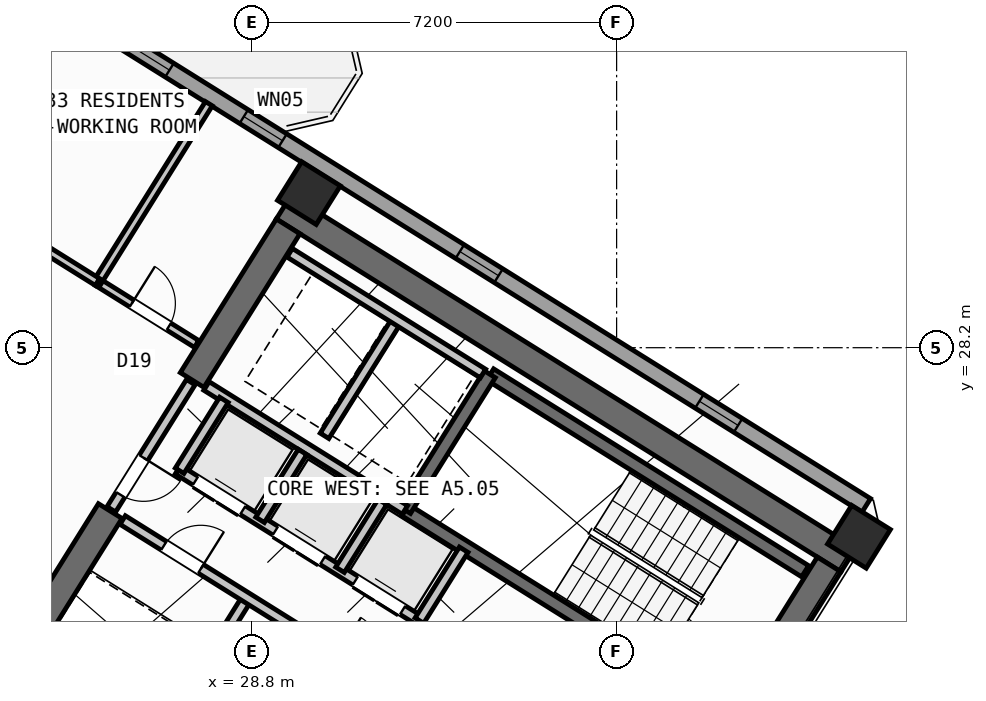
"""IFC4 building model, lengths in metres.
Left out: names, types, materials, properties, quantities, classifications, styles, units other than length and angle.
Written with IfcOpenShell. Run it as: python <this file> out.ifc"""

import sys

from ifc_helpers import new_model, si_unit, direction, frame, frame_2d, origin, origin_2d, place, context, subcontext, project, spatial, rectangle, hollow_rectangle, extrude, source, transform, mapped, element, fill, save


model = new_model("IFC4")
c1 = context("Model", 3, precision=1e-05, world=origin(), true_north=direction((0.0, 1.0)))
c2 = subcontext(c1, "Body", "Model", "MODEL_VIEW")
j1 = project(units=[si_unit("LENGTHUNIT", "METRE"), si_unit("PLANEANGLEUNIT", "RADIAN")], contexts=[c1])
p1 = place(None, origin())
s1 = spatial("IfcSite", under=j1, at=p1, CompositionType="ELEMENT")
p2 = place(p1, origin())
s2 = spatial("IfcBuilding", under=s1, at=p2, CompositionType="ELEMENT")
p3 = place(p2, frame((0.0, 0.0, 132.6)))
s3 = spatial("IfcBuildingStorey", under=s2, at=p3, CompositionType="ELEMENT", Elevation=132.6)
p4 = place(p3, frame((40.573, 24.01, 0.0), z_axis=(0.0, 0.0, 1.0), x_axis=(-0.848047359947, 0.529920442413, 0.0)))
e1 = element("IfcWall", 1, at=p4, inside=s3, PredefinedType="SHEAR", context=c2, shape_type="SweptSolid", body=[
    extrude(rectangle(XDim=13.14, YDim=0.55, at=frame_2d((6.57, 0.0))), origin(), (0.0, 0.0, 1.0), 3.32),
])
p5 = place(p3, frame((40.194, 23.922, 0.0), z_axis=(0.0, 0.0, 1.0), x_axis=(-0.529888438328, -0.848067357541, 0.0)))
e2 = element("IfcWall", 2, at=p5, inside=s3, PredefinedType="SHEAR", context=c2, shape_type="SweptSolid", body=[
    extrude(rectangle(XDim=3.575, YDim=0.55, at=frame_2d((1.788, 0.0))), origin(), (0.0, 0.0, 1.0), 3.32),
])
p6 = place(p3, frame((29.517, 30.594, 0.0), z_axis=(0.0, 0.0, 1.0), x_axis=(-0.529906864564, -0.848055844204, 0.0)))
e3 = element("IfcWall", 3, at=p6, inside=s3, PredefinedType="SHEAR", context=c2, shape_type="SweptSolid", body=[
    extrude(rectangle(XDim=3.575, YDim=0.55, at=frame_2d((1.788, 0.0))), origin(), (0.0, 0.0, 1.0), 3.32),
])
p7 = place(p3, frame((26.007, 24.976, 0.0), z_axis=(0.0, 0.0, 1.0), x_axis=(-0.529923795287, -0.848045264823, 0.0)))
e4 = element("IfcWall", 4, at=p7, inside=s3, PredefinedType="SHEAR", context=c2, shape_type="SweptSolid", body=[
    extrude(rectangle(XDim=6.425, YDim=0.55, at=frame_2d((3.212, 0.0))), origin(), (0.0, 0.0, 1.0), 3.32),
])
m1 = source(origin(), c2, "Body", "SweptSolid", [
    extrude(hollow_rectangle(XDim=0.9, YDim=0.9, WallThickness=0.036, at=origin_2d()), origin(), (0.0, 0.0, 1.0), 3.6),
])
for number, where, z_axis, x_axis in (
    (5, (40.783, 24.469, 0.0), (0.0, 0.0, 1.0), (-0.848, 0.53, 0.0)),
    (6, (29.928, 31.251, 0.0), (0.0, 0.0, 1.0), (-0.848, 0.53, 0.0)),
    (7, (24.5, 34.643, 0.0), (0.0, 0.0, 1.0), (-0.848, 0.53, 0.0)),
):
    element("IfcColumn", number, at=place(p3, frame(where, z_axis=z_axis, x_axis=x_axis)), inside=s3, PredefinedType="COLUMN", context=c2, shape_type="MappedRepresentation", body=[
        mapped(m1, transform((0.0, 0.0, 0.0), scale=1.0)),
    ])
p8 = place(p3, frame((29.268, 6.429, 0.0), z_axis=(0.0, 0.0, 1.0), x_axis=(-0.848049971435, 0.529916263149, 0.0)))
e8 = element("IfcWall", 8, at=p8, inside=s3, PredefinedType="STANDARD", context=c2, shape_type="SweptSolid", body=[
    extrude(rectangle(XDim=31.588, YDim=0.32, at=frame_2d((15.794, 0.0))), origin(), (0.0, 0.0, 1.0), 3.32),
])
p9 = place(p8, frame((16.362, 0.0, 0.0)))
e9 = element("IfcOpeningElement", 9, at=p9, cuts=e8, PredefinedType="OPENING", context=c2, shape_type="SweptSolid", body=[
    extrude(rectangle(XDim=1.2, YDim=2.15, at=frame_2d((0.6, 1.075))), frame((0.0, 0.17, 0.0), z_axis=(0.0, -1.0, 0.0), x_axis=(1.0, 0.0, 0.0)), (0.0, 0.0, 1.0), 0.34),
])
p10 = place(p8, frame((2.989, 0.0, 0.8)))
e10 = element("IfcOpeningElement", 10, at=p10, cuts=e8, PredefinedType="OPENING", context=c2, shape_type="SweptSolid", body=[
    extrude(rectangle(XDim=2.1, YDim=1.55, at=frame_2d((1.05, 0.775))), frame((0.0, 0.17, 0.0), z_axis=(0.0, -1.0, 0.0), x_axis=(1.0, 0.0, 0.0)), (0.0, 0.0, 1.0), 0.34),
])
p11 = place(p8, frame((8.359, 0.0, 0.8)))
e11 = element("IfcOpeningElement", 11, at=p11, cuts=e8, PredefinedType="OPENING", context=c2, shape_type="SweptSolid", body=[
    extrude(rectangle(XDim=2.1, YDim=1.55, at=frame_2d((1.05, 0.775))), frame((0.0, 0.17, 0.0), z_axis=(0.0, -1.0, 0.0), x_axis=(1.0, 0.0, 0.0)), (0.0, 0.0, 1.0), 0.34),
])
p12 = place(p8, frame((13.284, 0.0, 0.95)))
e12 = element("IfcOpeningElement", 12, at=p12, cuts=e8, PredefinedType="OPENING", context=c2, shape_type="SweptSolid", body=[
    extrude(rectangle(XDim=1.2, YDim=1.4, at=frame_2d((0.6, 0.7))), frame((0.0, 0.17, 0.0), z_axis=(0.0, -1.0, 0.0), x_axis=(1.0, 0.0, 0.0)), (0.0, 0.0, 1.0), 0.34),
])
p13 = place(p8, frame((20.39, 0.0, 0.95)))
e13 = element("IfcOpeningElement", 13, at=p13, cuts=e8, PredefinedType="OPENING", context=c2, shape_type="SweptSolid", body=[
    extrude(rectangle(XDim=1.2, YDim=1.4, at=frame_2d((0.6, 0.7))), frame((0.0, 0.17, 0.0), z_axis=(0.0, -1.0, 0.0), x_axis=(1.0, 0.0, 0.0)), (0.0, 0.0, 1.0), 0.34),
])
p14 = place(p8, frame((23.715, 0.0, 1.0)))
e14 = element("IfcOpeningElement", 14, at=p14, cuts=e8, PredefinedType="OPENING", context=c2, shape_type="SweptSolid", body=[
    extrude(rectangle(XDim=0.9, YDim=1.25, at=frame_2d((0.45, 0.625))), frame((0.0, 0.17, 0.0), z_axis=(0.0, -1.0, 0.0), x_axis=(1.0, 0.0, 0.0)), (0.0, 0.0, 1.0), 0.34),
])
p15 = place(p8, frame((27.481, 0.0, 0.8)))
e15 = element("IfcOpeningElement", 15, at=p15, cuts=e8, PredefinedType="OPENING", context=c2, shape_type="SweptSolid", body=[
    extrude(rectangle(XDim=2.1, YDim=1.55, at=frame_2d((1.05, 0.775))), frame((0.0, 0.17, 0.0), z_axis=(0.0, -1.0, 0.0), x_axis=(1.0, 0.0, 0.0)), (0.0, 0.0, 1.0), 0.34),
])
p16 = place(p3, frame((14.138, 41.825, 0.0), z_axis=(0.0, 0.0, 1.0), x_axis=(0.848046498049, -0.529921821731, 0.0)))
e16 = element("IfcWall", 16, at=p16, inside=s3, PredefinedType="STANDARD", context=c2, shape_type="SweptSolid", body=[
    extrude(rectangle(XDim=31.588, YDim=0.32, at=frame_2d((15.794, 0.0))), origin(), (0.0, 0.0, 1.0), 3.32),
])
p17 = place(p16, frame((3.253, 0.0, 0.0)))
e17 = element("IfcOpeningElement", 17, at=p17, cuts=e16, PredefinedType="OPENING", context=c2, shape_type="SweptSolid", body=[
    extrude(rectangle(XDim=1.05, YDim=2.15, at=frame_2d((0.525, 1.075))), frame((0.0, 0.17, 0.0), z_axis=(0.0, -1.0, 0.0), x_axis=(1.0, 0.0, 0.0)), (0.0, 0.0, 1.0), 0.34),
])
p18 = place(p16, frame((0.863, 0.0, 0.85)))
e18 = element("IfcOpeningElement", 18, at=p18, cuts=e16, PredefinedType="OPENING", context=c2, shape_type="SweptSolid", body=[
    extrude(rectangle(XDim=1.8, YDim=1.5, at=frame_2d((0.9, 0.75))), frame((0.0, 0.17, 0.0), z_axis=(0.0, -1.0, 0.0), x_axis=(1.0, 0.0, 0.0)), (0.0, 0.0, 1.0), 0.34),
])
p19 = place(p16, frame((8.435, 0.0, 0.85)))
e19 = element("IfcOpeningElement", 19, at=p19, cuts=e16, PredefinedType="OPENING", context=c2, shape_type="SweptSolid", body=[
    extrude(rectangle(XDim=1.8, YDim=1.5, at=frame_2d((0.9, 0.75))), frame((0.0, 0.17, 0.0), z_axis=(0.0, -1.0, 0.0), x_axis=(1.0, 0.0, 0.0)), (0.0, 0.0, 1.0), 0.34),
])
p20 = place(p16, frame((13.874, 0.0, 0.85)))
e20 = element("IfcOpeningElement", 20, at=p20, cuts=e16, PredefinedType="OPENING", context=c2, shape_type="SweptSolid", body=[
    extrude(rectangle(XDim=1.5, YDim=1.5, at=frame_2d((0.75, 0.75))), frame((0.0, 0.17, 0.0), z_axis=(0.0, -1.0, 0.0), x_axis=(1.0, 0.0, 0.0)), (0.0, 0.0, 1.0), 0.34),
])
p21 = place(p16, frame((17.104, 0.0, 1.0)))
e21 = element("IfcOpeningElement", 21, at=p21, cuts=e16, PredefinedType="OPENING", context=c2, shape_type="SweptSolid", body=[
    extrude(rectangle(XDim=0.9, YDim=1.25, at=frame_2d((0.45, 0.625))), frame((0.0, 0.17, 0.0), z_axis=(0.0, -1.0, 0.0), x_axis=(1.0, 0.0, 0.0)), (0.0, 0.0, 1.0), 0.34),
])
p22 = place(p16, frame((22.131, 0.0, 1.0)))
e22 = element("IfcOpeningElement", 22, at=p22, cuts=e16, PredefinedType="OPENING", context=c2, shape_type="SweptSolid", body=[
    extrude(rectangle(XDim=0.9, YDim=1.25, at=frame_2d((0.45, 0.625))), frame((0.0, 0.17, 0.0), z_axis=(0.0, -1.0, 0.0), x_axis=(1.0, 0.0, 0.0)), (0.0, 0.0, 1.0), 0.34),
])
p23 = place(p16, frame((27.706, 0.0, 1.0)))
e23 = element("IfcOpeningElement", 23, at=p23, cuts=e16, PredefinedType="OPENING", context=c2, shape_type="SweptSolid", body=[
    extrude(rectangle(XDim=0.9, YDim=1.25, at=frame_2d((0.45, 0.625))), frame((0.0, 0.17, 0.0), z_axis=(0.0, -1.0, 0.0), x_axis=(1.0, 0.0, 0.0)), (0.0, 0.0, 1.0), 0.34),
])
p24 = place(p3, frame((39.721, 23.788, 0.0), z_axis=(0.0, 0.0, 1.0), x_axis=(-0.848054434086, 0.529909121291, 0.0)))
e24 = element("IfcWall", 24, at=p24, inside=s3, PredefinedType="SHEAR", context=c2, shape_type="SweptSolid", body=[
    extrude(rectangle(XDim=7.33, YDim=0.26, at=frame_2d((3.665, 0.0))), origin(), (0.0, 0.0, 1.0), 3.32),
])
p25 = place(p3, frame((38.046, 21.108, 0.0), z_axis=(0.0, 0.0, 1.0), x_axis=(-0.848054434086, 0.529909121291, 0.0)))
e25 = element("IfcWall", 25, at=p25, inside=s3, PredefinedType="SHEAR", context=c2, shape_type="SweptSolid", body=[
    extrude(rectangle(XDim=7.33, YDim=0.26, at=frame_2d((3.665, 0.0))), origin(), (0.0, 0.0, 1.0), 3.32),
])
p26 = place(p25, frame((0.22, 0.0, 0.0)))
e26 = element("IfcOpeningElement", 26, at=p26, cuts=e25, PredefinedType="OPENING", context=c2, shape_type="SweptSolid", body=[
    extrude(rectangle(XDim=1.1, YDim=2.1, at=frame_2d((0.55, 1.05))), frame((0.0, 0.14, 0.0), z_axis=(0.0, -1.0, 0.0), x_axis=(1.0, 0.0, 0.0)), (0.0, 0.0, 1.0), 0.28),
])
p27 = place(p3, frame((33.496, 27.677, 0.0), z_axis=(0.0, 0.0, 1.0), x_axis=(-0.529908658664, -0.84805472316, 0.0)))
e27 = element("IfcWall", 27, at=p27, inside=s3, PredefinedType="SHEAR", context=c2, shape_type="SweptSolid", body=[
    extrude(rectangle(XDim=3.16, YDim=0.26, at=frame_2d((1.58, 0.0))), origin(), (0.0, 0.0, 1.0), 3.32),
])
p28 = place(p3, frame((31.822, 24.998, 0.0), z_axis=(0.0, 0.0, 1.0), x_axis=(-0.848036912365, 0.52993716162, 0.0)))
e28 = element("IfcWall", 28, at=p28, inside=s3, PredefinedType="STANDARD", context=c2, shape_type="SweptSolid", body=[
    extrude(rectangle(XDim=4.618, YDim=0.2, at=frame_2d((2.309, 0.0))), origin(), (0.0, 0.0, 1.0), 3.31),
])
p29 = place(p3, frame((32.108, 22.814, 0.0), z_axis=(0.0, 0.0, 1.0), x_axis=(-0.848042229521, 0.529928652696, 0.0)))
e29 = element("IfcWall", 29, at=p29, inside=s3, PredefinedType="STANDARD", context=c2, shape_type="SweptSolid", body=[
    extrude(rectangle(XDim=5.62, YDim=0.2, at=frame_2d((2.81, 0.0))), origin(), (0.0, 0.0, 1.0), 3.31),
])
p30 = place(p29, frame((0.39, 0.0, 0.0)))
e30 = element("IfcOpeningElement", 30, at=p30, cuts=e29, PredefinedType="OPENING", context=c2, shape_type="SweptSolid", body=[
    extrude(rectangle(XDim=1.1, YDim=2.15, at=frame_2d((0.55, 1.075))), frame((0.0, 0.11, 0.0), z_axis=(0.0, -1.0, 0.0), x_axis=(1.0, 0.0, 0.0)), (0.0, 0.0, 1.0), 0.22),
])
p31 = place(p29, frame((2.25, 0.0, 0.0)))
e31 = element("IfcOpeningElement", 31, at=p31, cuts=e29, PredefinedType="OPENING", context=c2, shape_type="SweptSolid", body=[
    extrude(rectangle(XDim=1.1, YDim=2.15, at=frame_2d((0.55, 1.075))), frame((0.0, 0.11, 0.0), z_axis=(0.0, -1.0, 0.0), x_axis=(1.0, 0.0, 0.0)), (0.0, 0.0, 1.0), 0.22),
])
p32 = place(p29, frame((4.11, 0.0, 0.0)))
e32 = element("IfcOpeningElement", 32, at=p32, cuts=e29, PredefinedType="OPENING", context=c2, shape_type="SweptSolid", body=[
    extrude(rectangle(XDim=1.1, YDim=2.15, at=frame_2d((0.55, 1.075))), frame((0.0, 0.11, 0.0), z_axis=(0.0, -1.0, 0.0), x_axis=(1.0, 0.0, 0.0)), (0.0, 0.0, 1.0), 0.22),
])
p33 = place(p3, frame((32.982, 24.213, 0.0), z_axis=(0.0, 0.0, 1.0), x_axis=(-0.529839334948, -0.84809803628, 0.0)))
e33 = element("IfcWall", 33, at=p33, inside=s3, PredefinedType="STANDARD", context=c2, shape_type="SweptSolid", body=[
    extrude(rectangle(XDim=1.65, YDim=0.2, at=frame_2d((0.825, 0.0))), origin(), (0.0, 0.0, 1.0), 3.31),
])
p34 = place(p3, frame((28.25, 27.17, 0.0), z_axis=(0.0, 0.0, 1.0), x_axis=(-0.529905827651, -0.848056492117, 0.0)))
e34 = element("IfcWall", 34, at=p34, inside=s3, PredefinedType="STANDARD", context=c2, shape_type="SweptSolid", body=[
    extrude(rectangle(XDim=1.65, YDim=0.2, at=frame_2d((0.825, 0.0))), origin(), (0.0, 0.0, 1.0), 3.31),
])
p35 = place(p3, frame((31.645, 28.716, 0.0), z_axis=(0.0, 0.0, 1.0), x_axis=(-0.52986693015, -0.848080795876, 0.0)))
e35 = element("IfcWall", 35, at=p35, inside=s3, PredefinedType="STANDARD", context=c2, shape_type="SweptSolid", body=[
    extrude(rectangle(XDim=2.66, YDim=0.2, at=frame_2d((1.33, 0.0))), origin(), (0.0, 0.0, 1.0), 3.31),
])
p36 = place(p3, frame((33.363, 27.69, 0.0), z_axis=(0.0, 0.0, 1.0), x_axis=(-0.848047090064, 0.529920874315, 0.0)))
e36 = element("IfcWall", 36, at=p36, inside=s3, PredefinedType="STANDARD", context=c2, shape_type="SweptSolid", body=[
    extrude(rectangle(XDim=4.498, YDim=0.2, at=frame_2d((2.249, 0.0))), origin(), (0.0, 0.0, 1.0), 3.31),
])
for number, where, z_axis, x_axis in (
    (37, (31.379, 25.156, 0.0), (0.0, 0.0, 1.0), (-0.53, -0.848, 0.0)),
    (38, (29.801, 26.142, 0.0), (0.0, 0.0, 1.0), (-0.53, -0.848, 0.0)),
):
    element("IfcWall", number, at=place(p3, frame(where, z_axis=z_axis, x_axis=x_axis)), inside=s3, PredefinedType="STANDARD", context=c2, shape_type="SweptSolid", body=[
        extrude(rectangle(XDim=1.58, YDim=0.2, at=frame_2d((0.79, 0.0))), origin(), (0.0, 0.0, 1.0), 3.31),
    ])
p37 = place(p3, frame((28.71, 23.263, 0.0), z_axis=(0.0, 0.0, 1.0), x_axis=(-0.529907497854, -0.848055448493, 0.0)))
e39 = element("IfcWall", 39, at=p37, inside=s3, PredefinedType="STANDARD", context=c2, shape_type="SweptSolid", body=[
    extrude(rectangle(XDim=2.88, YDim=0.2, at=frame_2d((1.44, 0.0))), origin(), (0.0, 0.0, 1.0), 3.31),
])
p38 = place(p3, frame((31.525, 21.504, 0.0), z_axis=(0.0, 0.0, 1.0), x_axis=(-0.848040211232, 0.529931882541, 0.0)))
e40 = element("IfcWall", 40, at=p38, inside=s3, PredefinedType="STANDARD", context=c2, shape_type="SweptSolid", body=[
    extrude(rectangle(XDim=6.218, YDim=0.2, at=frame_2d((3.109, 0.0))), origin(), (0.0, 0.0, 1.0), 3.31),
])
p39 = place(p38, frame((4.4, 0.0, 0.0)))
e41 = element("IfcOpeningElement", 41, at=p39, cuts=e40, PredefinedType="OPENING", context=c2, shape_type="SweptSolid", body=[
    extrude(rectangle(XDim=0.86, YDim=2.05, at=frame_2d((0.43, 1.025))), frame((0.0, 0.11, 0.0), z_axis=(0.0, -1.0, 0.0), x_axis=(1.0, 0.0, 0.0)), (0.0, 0.0, 1.0), 0.22),
])
p40 = place(p38, frame((0.35, 0.0, 0.0)))
e42 = element("IfcOpeningElement", 42, at=p40, cuts=e40, PredefinedType="OPENING", context=c2, shape_type="SweptSolid", body=[
    extrude(rectangle(XDim=0.86, YDim=2.05, at=frame_2d((0.43, 1.025))), frame((0.0, 0.11, 0.0), z_axis=(0.0, -1.0, 0.0), x_axis=(1.0, 0.0, 0.0)), (0.0, 0.0, 1.0), 0.22),
])
p41 = place(p3, frame((27.596, 27.52, 0.0), z_axis=(0.0, 0.0, 1.0), x_axis=(-0.529865479138, -0.848081702443, 0.0)))
e43 = element("IfcWall", 43, at=p41, inside=s3, PredefinedType="STANDARD", context=c2, shape_type="SweptSolid", body=[
    extrude(rectangle(XDim=2.96, YDim=0.2, at=frame_2d((1.48, 0.0))), origin(), (0.0, 0.0, 1.0), 3.31),
])
p42 = place(p41, frame((1.76, 0.0, 0.0)))
e44 = element("IfcOpeningElement", 44, at=p42, cuts=e43, PredefinedType="OPENING", context=c2, shape_type="SweptSolid", body=[
    extrude(rectangle(XDim=0.86, YDim=2.05, at=frame_2d((0.43, 1.025))), frame((0.0, 0.11, 0.0), z_axis=(0.0, -1.0, 0.0), x_axis=(1.0, 0.0, 0.0)), (0.0, 0.0, 1.0), 0.22),
])
p43 = place(p3, frame((27.711, 28.274, 0.0), z_axis=(0.0, 0.0, 1.0), x_axis=(-0.848075553449, 0.529875320846, 0.0)))
e45 = element("IfcWall", 45, at=p43, inside=s3, PredefinedType="PARTITIONING", context=c2, shape_type="SweptSolid", body=[
    extrude(rectangle(XDim=2.308, YDim=0.16, at=frame_2d((1.154, 0.0))), origin(), (0.0, 0.0, 1.0), 3.31),
])
p44 = place(p43, frame((0.648, 0.0, 0.0)))
e46 = element("IfcOpeningElement", 46, at=p44, cuts=e45, PredefinedType="OPENING", context=c2, shape_type="SweptSolid", body=[
    extrude(rectangle(XDim=0.86, YDim=2.05, at=frame_2d((0.43, 1.025))), frame((0.0, 0.09, 0.0), z_axis=(0.0, -1.0, 0.0), x_axis=(1.0, 0.0, 0.0)), (0.0, 0.0, 1.0), 0.18),
])
p45 = place(p3, frame((27.953, 33.016, 0.0), z_axis=(0.0, 0.0, 1.0), x_axis=(-0.529872022255, -0.848077614391, 0.0)))
e47 = element("IfcWall", 47, at=p45, inside=s3, PredefinedType="PARTITIONING", context=c2, shape_type="SweptSolid", body=[
    extrude(rectangle(XDim=4.15, YDim=0.16, at=frame_2d((2.075, 0.0))), origin(), (0.0, 0.0, 1.0), 3.31),
])
p46 = place(p3, frame((25.754, 29.497, 0.0), z_axis=(0.0, 0.0, 1.0), x_axis=(-0.848045850158, 0.529922858565, 0.0)))
e48 = element("IfcWall", 48, at=p46, inside=s3, PredefinedType="PARTITIONING", context=c2, shape_type="SweptSolid", body=[
    extrude(rectangle(XDim=16.73, YDim=0.16, at=frame_2d((8.365, 0.0))), origin(), (0.0, 0.0, 1.0), 3.31),
])
p47 = place(p46, frame((1.588, 0.0, 0.0)))
e49 = element("IfcOpeningElement", 49, at=p47, cuts=e48, PredefinedType="OPENING", context=c2, shape_type="SweptSolid", body=[
    extrude(rectangle(XDim=1.0, YDim=2.1, at=frame_2d((0.5, 1.05))), frame((0.0, 0.09, 0.0), z_axis=(0.0, -1.0, 0.0), x_axis=(1.0, 0.0, 0.0)), (0.0, 0.0, 1.0), 0.18),
])
p48 = place(p46, frame((6.685, 0.0, 0.0)))
e50 = element("IfcOpeningElement", 50, at=p48, cuts=e48, PredefinedType="OPENING", context=c2, shape_type="SweptSolid", body=[
    extrude(rectangle(XDim=1.0, YDim=2.1, at=frame_2d((0.5, 1.05))), frame((0.0, 0.09, 0.0), z_axis=(0.0, -1.0, 0.0), x_axis=(1.0, 0.0, 0.0)), (0.0, 0.0, 1.0), 0.18),
])
p49 = place(p46, frame((12.951, 0.0, 0.0)))
e51 = element("IfcOpeningElement", 51, at=p49, cuts=e48, PredefinedType="OPENING", context=c2, shape_type="SweptSolid", body=[
    extrude(rectangle(XDim=1.0, YDim=2.1, at=frame_2d((0.5, 1.05))), frame((0.0, 0.09, 0.0), z_axis=(0.0, -1.0, 0.0), x_axis=(1.0, 0.0, 0.0)), (0.0, 0.0, 1.0), 0.18),
])
m2 = source(origin(), c2, "Body", "SweptSolid", [
    extrude(rectangle(XDim=1.5, YDim=1.5, at=frame_2d((0.75, 0.75))), frame((0.0, 0.03, 0.0), z_axis=(0.0, -1.0, 0.0), x_axis=(1.0, 0.0, 0.0)), (0.0, 0.0, 1.0), 0.06),
])
p50 = place(p20, origin())
e52 = element("IfcWindow", 52, at=p50, inside=s3, PartitioningType="SINGLE_PANEL", PredefinedType="WINDOW", context=c2, shape_type="MappedRepresentation", body=[
    mapped(m2, transform((0.0, 0.0, 0.0), scale=1.0)),
])
fill(e20, e52)
m3 = source(origin(), c2, "Body", "SweptSolid", [
    extrude(rectangle(XDim=0.9, YDim=1.25, at=frame_2d((0.45, 0.625))), frame((0.0, 0.03, 0.0), z_axis=(0.0, -1.0, 0.0), x_axis=(1.0, 0.0, 0.0)), (0.0, 0.0, 1.0), 0.06),
])
p51 = place(p21, origin())
e53 = element("IfcWindow", 53, at=p51, inside=s3, PartitioningType="SINGLE_PANEL", PredefinedType="WINDOW", context=c2, shape_type="MappedRepresentation", body=[
    mapped(m3, transform((0.0, 0.0, 0.0), scale=1.0)),
])
fill(e21, e53)
p52 = place(p22, origin())
e54 = element("IfcWindow", 54, at=p52, inside=s3, PartitioningType="SINGLE_PANEL", PredefinedType="WINDOW", context=c2, shape_type="MappedRepresentation", body=[
    mapped(m3, transform((0.0, 0.0, 0.0), scale=1.0)),
])
fill(e22, e54)
p53 = place(p23, origin())
e55 = element("IfcWindow", 55, at=p53, inside=s3, PartitioningType="SINGLE_PANEL", PredefinedType="WINDOW", context=c2, shape_type="MappedRepresentation", body=[
    mapped(m3, transform((0.0, 0.0, 0.0), scale=1.0)),
])
fill(e23, e55)
m4 = source(origin(), c2, "Body", "SweptSolid", [
    extrude(rectangle(XDim=1.1, YDim=2.15, at=frame_2d((0.55, 1.075))), frame((0.0, 0.025, 0.0), z_axis=(0.0, -1.0, 0.0), x_axis=(1.0, 0.0, 0.0)), (0.0, 0.0, 1.0), 0.05),
])
p54 = place(p30, origin())
e56 = element("IfcDoor", 56, at=p54, inside=s3, OperationType="DOUBLE_DOOR_SLIDING", PredefinedType="DOOR", context=c2, shape_type="MappedRepresentation", body=[
    mapped(m4, transform((0.0, 0.0, 0.0), scale=1.0)),
])
fill(e30, e56)
p55 = place(p31, origin())
e57 = element("IfcDoor", 57, at=p55, inside=s3, OperationType="DOUBLE_DOOR_SLIDING", PredefinedType="DOOR", context=c2, shape_type="MappedRepresentation", body=[
    mapped(m4, transform((0.0, 0.0, 0.0), scale=1.0)),
])
fill(e31, e57)
p56 = place(p32, origin())
e58 = element("IfcDoor", 58, at=p56, inside=s3, OperationType="DOUBLE_DOOR_SLIDING", PredefinedType="DOOR", context=c2, shape_type="MappedRepresentation", body=[
    mapped(m4, transform((0.0, 0.0, 0.0), scale=1.0)),
])
fill(e32, e58)
m5 = source(origin(), c2, "Body", "SweptSolid", [
    extrude(rectangle(XDim=0.86, YDim=2.05, at=frame_2d((0.43, 1.025))), frame((0.0, 0.025, 0.0), z_axis=(0.0, -1.0, 0.0), x_axis=(1.0, 0.0, 0.0)), (0.0, 0.0, 1.0), 0.05),
])
p57 = place(p39, frame((0.86, 0.0, 0.0), z_axis=(0.0, 0.0, 1.0), x_axis=(-1.0, 0.0, 0.0)))
e59 = element("IfcDoor", 59, at=p57, inside=s3, OperationType="SINGLE_SWING_RIGHT", PredefinedType="DOOR", context=c2, shape_type="MappedRepresentation", body=[
    mapped(m5, transform((0.0, 0.0, 0.0), scale=1.0)),
])
fill(e41, e59)
p58 = place(p44, frame((0.86, 0.0, 0.0), z_axis=(0.0, 0.0, 1.0), x_axis=(-1.0, 0.0, 0.0)))
e60 = element("IfcDoor", 60, at=p58, inside=s3, OperationType="SINGLE_SWING_LEFT", PredefinedType="DOOR", context=c2, shape_type="MappedRepresentation", body=[
    mapped(m5, transform((0.0, 0.0, 0.0), scale=1.0)),
])
fill(e46, e60)
p59 = place(p42, origin())
e61 = element("IfcDoor", 61, at=p59, inside=s3, OperationType="SINGLE_SWING_LEFT", PredefinedType="DOOR", context=c2, shape_type="MappedRepresentation", body=[
    mapped(m5, transform((0.0, 0.0, 0.0), scale=1.0)),
])
fill(e44, e61)
save(model, sys.argv[1])
